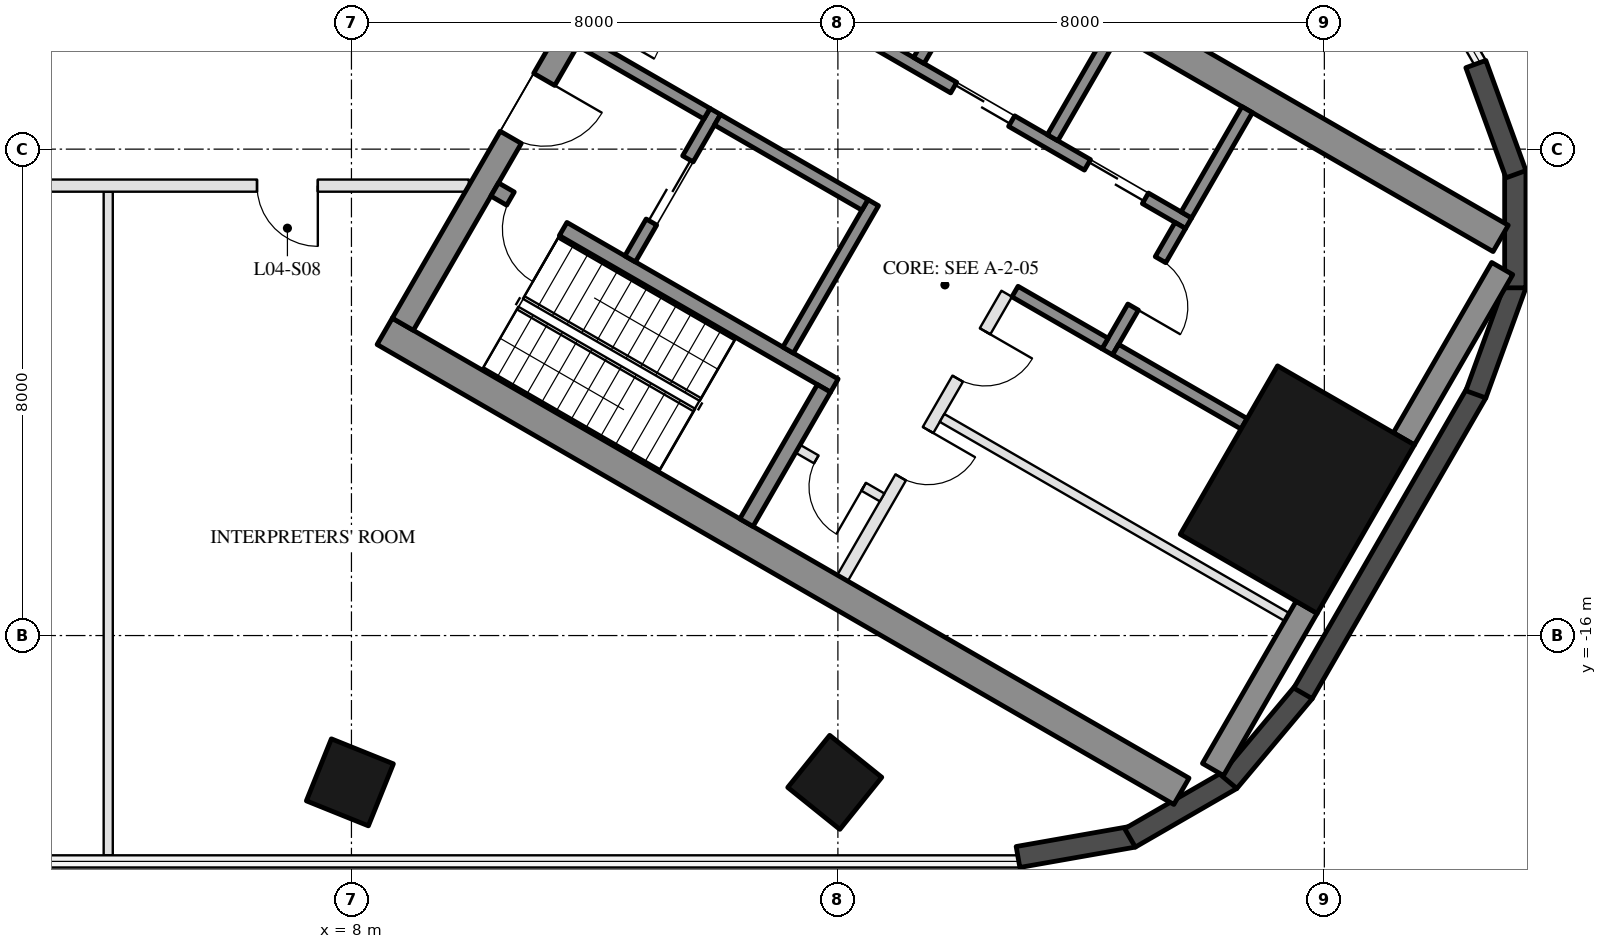
"""IFC4 building model, lengths in metres.
Left out: names, types, materials, properties, quantities, classifications, styles, units other than length and angle.
Written with IfcOpenShell. Run it as: python <this file> out.ifc"""

import sys

from ifc_helpers import new_model, si_unit, direction, frame, frame_2d, origin, origin_2d, place, context, subcontext, project, spatial, rectangle, hollow_rectangle, extrude, boolean, halfspace, element, fill, save


model = new_model("IFC4")
c1 = context("Model", 3, precision=1e-05, world=origin(), true_north=direction((0.0, 1.0)))
c2 = subcontext(c1, "Body", "Model", "MODEL_VIEW")
j1 = project(units=[si_unit("LENGTHUNIT", "METRE"), si_unit("PLANEANGLEUNIT", "RADIAN")], contexts=[c1])
p1 = place(None, origin())
s1 = spatial("IfcSite", under=j1, at=p1, CompositionType="ELEMENT")
p2 = place(p1, origin())
s2 = spatial("IfcBuilding", under=s1, at=p2, CompositionType="ELEMENT")
p3 = place(p2, frame((0.0, 0.0, 28.5)))
s3 = spatial("IfcBuildingStorey", under=s2, at=p3, CompositionType="ELEMENT", Elevation=28.5)
p4 = place(p3, frame((7.974, -18.414, 0.0), z_axis=(-0.012363018834, 0.030690652017, 0.999452469927), x_axis=(0.999923507967, 1.3568651e-05, 0.012368428817)))
e1 = element("IfcColumn", 1, at=p4, inside=s3, PredefinedType="COLUMN", context=c2, shape_type="SweptSolid", body=[
    boolean("DIFFERENCE", boolean("DIFFERENCE", extrude(hollow_rectangle(XDim=1.1, YDim=1.1, WallThickness=0.05, at=origin_2d()), origin(), (0.0, 0.0, 1.0), 4.502), halfspace(frame((0.0, 0.0, 0.011), z_axis=(0.0, 0.0, 1.0), x_axis=(1.0, 0.0, 0.0)), True)), halfspace(frame((0.0, 0.0, 4.492), z_axis=(0.0, 0.0, 1.0), x_axis=(1.0, 0.0, 0.0)), False)),
])
p5 = place(p3, frame((15.948, -18.414, 0.0), z_axis=(-0.024720370768, 0.030683618102, 0.999223407877), x_axis=(0.99969438665, 0.000567544207, 0.024714594742)))
e2 = element("IfcColumn", 2, at=p5, inside=s3, PredefinedType="COLUMN", context=c2, shape_type="SweptSolid", body=[
    boolean("DIFFERENCE", boolean("DIFFERENCE", extrude(hollow_rectangle(XDim=1.1, YDim=1.1, WallThickness=0.05, at=origin_2d()), origin(), (0.0, 0.0, 1.0), 4.503), halfspace(frame((0.0, 0.0, 0.013), z_axis=(0.0, 0.0, 1.0), x_axis=(1.0, 0.0, 0.0)), True)), halfspace(frame((0.0, 0.0, 4.491), z_axis=(0.0, 0.0, 1.0), x_axis=(1.0, 0.0, 0.0)), False)),
])
p6 = place(p3, frame((23.556, -13.6, 0.0), z_axis=(0.0, 0.0, 1.0), x_axis=(0.5, 0.866025403784, 0.0)))
e3 = element("IfcColumn", 3, at=p6, inside=s3, PredefinedType="COLUMN", context=c2, shape_type="SweptSolid", body=[
    extrude(hollow_rectangle(XDim=3.2, YDim=2.6, WallThickness=0.08, at=origin_2d()), origin(), (0.0, 0.0, 1.0), 4.5),
])
for number, where, z_axis, x_axis in (
    (4, (18.962, -19.642, 0.0), (0.0, 0.0, 1.0), (0.985, 0.174, 0.0)),
    (5, (20.804, -19.328, 0.0), (0.0, 0.0, 1.0), (0.866, 0.5, 0.0)),
    (6, (22.427, -18.403, 0.0), (0.0, 0.0, 1.0), (0.643, 0.766, 0.0)),
):
    element("IfcWall", number, at=place(p3, frame(where, z_axis=z_axis, x_axis=x_axis)), inside=s3, PredefinedType="SOLIDWALL", context=c2, shape_type="SweptSolid", body=[
        extrude(rectangle(XDim=1.928, YDim=0.35, at=frame_2d((0.964, 0.0))), origin(), (0.0, 0.0, 1.0), 4.2),
    ])
p7 = place(p3, frame((23.649, -16.951, 0.0), z_axis=(0.0, 0.0, 1.0), x_axis=(0.500014776476, 0.866016872414, 0.0)))
e7 = element("IfcWall", 7, at=p7, inside=s3, PredefinedType="SOLIDWALL", context=c2, shape_type="SweptSolid", body=[
    extrude(rectangle(XDim=5.711, YDim=0.35, at=frame_2d((2.855, 0.0))), origin(), (0.0, 0.0, 1.0), 4.2),
])
for number, where, z_axis, x_axis in (
    (8, (26.491, -12.033, 0.0), (0.0, 0.0, 1.0), (0.342, 0.94, 0.0)),
    (9, (27.14, -10.281, 0.0), (0.0, 0.0, 1.0), (0.0, 1.0, 0.0)),
    (10, (27.151, -8.413, 0.0), (0.0, 0.0, 1.0), (-0.342, 0.94, 0.0)),
):
    element("IfcWall", number, at=place(p3, frame(where, z_axis=z_axis, x_axis=x_axis)), inside=s3, PredefinedType="SOLIDWALL", context=c2, shape_type="SweptSolid", body=[
        extrude(rectangle(XDim=1.928, YDim=0.35, at=frame_2d((0.964, 0.0))), origin(), (0.0, 0.0, 1.0), 4.2),
    ])
for number, where, z_axis, x_axis in (
    (11, (8.547, -10.997, 0.0), (0.0, 0.0, 1.0), (0.866, -0.5, 0.0)),
    (12, (13.797, -1.903, 0.0), (0.0, 0.0, 1.0), (0.866, -0.5, 0.0)),
):
    element("IfcWall", number, at=place(p3, frame(where, z_axis=z_axis, x_axis=x_axis)), inside=s3, PredefinedType="SHEAR", context=c2, shape_type="SweptSolid", body=[
        extrude(rectangle(XDim=15.13, YDim=0.5, at=frame_2d((7.565, 0.0))), origin(), (0.0, 0.0, 1.0), 4.2),
    ])
p8 = place(p3, frame((8.845, -10.88, 0.0), z_axis=(0.0, 0.0, 1.0), x_axis=(0.500004234368, 0.866022959057, 0.0)))
e13 = element("IfcWall", 13, at=p8, inside=s3, PredefinedType="SHEAR", context=c2, shape_type="SweptSolid", body=[
    extrude(rectangle(XDim=10.0, YDim=0.4, at=frame_2d((5.0, 0.0))), origin(), (0.0, 0.0, 1.0), 4.2),
])
p9 = place(p8, frame((3.55, 0.0, 0.0)))
e14 = element("IfcOpeningElement", 14, at=p9, cuts=e13, PredefinedType="OPENING", context=c2, shape_type="SweptSolid", body=[
    extrude(rectangle(XDim=1.1, YDim=2.1, at=frame_2d((0.55, 1.05))), frame((0.0, 0.21, 0.0), z_axis=(0.0, -1.0, 0.0), x_axis=(1.0, 0.0, 0.0)), (0.0, 0.0, 1.0), 0.42),
])
p10 = place(p8, frame((5.85, 0.0, 0.0)))
e15 = element("IfcOpeningElement", 15, at=p10, cuts=e13, PredefinedType="OPENING", context=c2, shape_type="SweptSolid", body=[
    extrude(rectangle(XDim=1.4, YDim=2.1, at=frame_2d((0.7, 1.05))), frame((0.0, 0.21, 0.0), z_axis=(0.0, -1.0, 0.0), x_axis=(1.0, 0.0, 0.0)), (0.0, 0.0, 1.0), 0.42),
])
p11 = place(p3, frame((22.168, -18.203, 0.0), z_axis=(0.0, 0.0, 1.0), x_axis=(0.500026652407, 0.866010015463, 0.0)))
e16 = element("IfcWall", 16, at=p11, inside=s3, PredefinedType="SHEAR", context=c2, shape_type="SweptSolid", body=[
    extrude(rectangle(XDim=3.08, YDim=0.4, at=frame_2d((1.54, 0.0))), origin(), (0.0, 0.0, 1.0), 4.2),
])
p12 = place(p3, frame((25.309, -12.764, 0.0), z_axis=(0.0, 0.0, 1.0), x_axis=(0.499955552719, 0.866051063914, 0.0)))
e17 = element("IfcWall", 17, at=p12, inside=s3, PredefinedType="SHEAR", context=c2, shape_type="SweptSolid", body=[
    extrude(rectangle(XDim=3.234, YDim=0.4, at=frame_2d((1.617, 0.0))), origin(), (0.0, 0.0, 1.0), 4.2),
])
p13 = place(p3, frame((10.356, -8.664, 0.0), z_axis=(0.0, 0.0, 1.0), x_axis=(0.866028629588, -0.499994412703, 0.0)))
e18 = element("IfcWall", 18, at=p13, inside=s3, PredefinedType="SHEAR", context=c2, shape_type="SweptSolid", body=[
    extrude(rectangle(XDim=6.45, YDim=0.25, at=frame_2d((3.225, 0.0))), origin(), (0.0, 0.0, 1.0), 4.2),
])
p14 = place(p13, frame((0.3, 0.0, 0.0)))
e19 = element("IfcOpeningElement", 19, at=p14, cuts=e18, PredefinedType="OPENING", context=c2, shape_type="SweptSolid", body=[
    extrude(rectangle(XDim=1.0, YDim=2.1, at=frame_2d((0.5, 1.05))), frame((0.0, 0.135, 0.0), z_axis=(0.0, -1.0, 0.0), x_axis=(1.0, 0.0, 0.0)), (0.0, 0.0, 1.0), 0.27),
])
p15 = place(p3, frame((14.496, -14.143, 0.0), z_axis=(0.0, 0.0, 1.0), x_axis=(0.500062241894, 0.865989465428, 0.0)))
e20 = element("IfcWall", 20, at=p15, inside=s3, PredefinedType="SHEAR", context=c2, shape_type="SweptSolid", body=[
    extrude(rectangle(XDim=2.55, YDim=0.25, at=frame_2d((1.275, 0.0))), origin(), (0.0, 0.0, 1.0), 4.2),
])
p16 = place(p3, frame((15.181, -11.305, 0.0), z_axis=(0.0, 0.0, 1.0), x_axis=(0.49994636267, 0.866056369097, 0.0)))
e21 = element("IfcWall", 21, at=p16, inside=s3, PredefinedType="SHEAR", context=c2, shape_type="SweptSolid", body=[
    extrude(rectangle(XDim=2.8, YDim=0.2, at=frame_2d((1.4, 0.0))), origin(), (0.0, 0.0, 1.0), 4.2),
])
p17 = place(p3, frame((12.583, -9.805, 0.0), z_axis=(0.0, 0.0, 1.0), x_axis=(0.49994636267, 0.866056369097, 0.0)))
e22 = element("IfcWall", 22, at=p17, inside=s3, PredefinedType="SHEAR", context=c2, shape_type="SweptSolid", body=[
    extrude(rectangle(XDim=2.8, YDim=0.2, at=frame_2d((1.4, 0.0))), origin(), (0.0, 0.0, 1.0), 4.2),
])
p18 = place(p17, frame((0.7, 0.0, 0.0)))
e23 = element("IfcOpeningElement", 23, at=p18, cuts=e22, PredefinedType="OPENING", context=c2, shape_type="SweptSolid", body=[
    extrude(rectangle(XDim=1.2, YDim=2.1, at=frame_2d((0.6, 1.05))), frame((0.0, 0.11, 0.0), z_axis=(0.0, -1.0, 0.0), x_axis=(1.0, 0.0, 0.0)), (0.0, 0.0, 1.0), 0.22),
])
p19 = place(p3, frame((11.768, -6.217, 0.0), z_axis=(0.0, 0.0, 1.0), x_axis=(0.866050077142, -0.499957262057, 0.0)))
e24 = element("IfcWall", 24, at=p19, inside=s3, PredefinedType="SHEAR", context=c2, shape_type="SweptSolid", body=[
    extrude(rectangle(XDim=2.4, YDim=0.2, at=frame_2d((1.2, 0.0))), origin(), (0.0, 0.0, 1.0), 4.2),
])
p20 = place(p3, frame((14.02, -7.517, 0.0), z_axis=(0.0, 0.0, 1.0), x_axis=(0.866034573852, -0.49998411664, 0.0)))
e25 = element("IfcWall", 25, at=p20, inside=s3, PredefinedType="SHEAR", context=c2, shape_type="SweptSolid", body=[
    extrude(rectangle(XDim=2.8, YDim=0.2, at=frame_2d((1.4, 0.0))), origin(), (0.0, 0.0, 1.0), 4.2),
])
p21 = place(p3, frame((12.968, -4.138, 0.0), z_axis=(0.0, 0.0, 1.0), x_axis=(0.866028328073, -0.49999493495, 0.0)))
e26 = element("IfcWall", 26, at=p21, inside=s3, PredefinedType="SHEAR", context=c2, shape_type="SweptSolid", body=[
    extrude(rectangle(XDim=10.16, YDim=0.2, at=frame_2d((5.08, 0.0))), origin(), (0.0, 0.0, 1.0), 4.2),
])
p22 = place(p21, frame((0.62, 0.0, 0.0)))
e27 = element("IfcOpeningElement", 27, at=p22, cuts=e26, PredefinedType="OPENING", context=c2, shape_type="SweptSolid", body=[
    extrude(rectangle(XDim=1.1, YDim=2.1, at=frame_2d((0.55, 1.05))), frame((0.0, 0.11, 0.0), z_axis=(0.0, -1.0, 0.0), x_axis=(1.0, 0.0, 0.0)), (0.0, 0.0, 1.0), 0.22),
])
p23 = place(p21, frame((3.16, 0.0, 0.0)))
e28 = element("IfcOpeningElement", 28, at=p23, cuts=e26, PredefinedType="OPENING", context=c2, shape_type="SweptSolid", body=[
    extrude(rectangle(XDim=1.1, YDim=2.1, at=frame_2d((0.55, 1.05))), frame((0.0, 0.11, 0.0), z_axis=(0.0, -1.0, 0.0), x_axis=(1.0, 0.0, 0.0)), (0.0, 0.0, 1.0), 0.22),
])
p24 = place(p21, frame((5.7, 0.0, 0.0)))
e29 = element("IfcOpeningElement", 29, at=p24, cuts=e26, PredefinedType="OPENING", context=c2, shape_type="SweptSolid", body=[
    extrude(rectangle(XDim=1.1, YDim=2.1, at=frame_2d((0.55, 1.05))), frame((0.0, 0.11, 0.0), z_axis=(0.0, -1.0, 0.0), x_axis=(1.0, 0.0, 0.0)), (0.0, 0.0, 1.0), 0.22),
])
p25 = place(p21, frame((8.24, 0.0, 0.0)))
e30 = element("IfcOpeningElement", 30, at=p25, cuts=e26, PredefinedType="OPENING", context=c2, shape_type="SweptSolid", body=[
    extrude(rectangle(XDim=1.1, YDim=2.1, at=frame_2d((0.55, 1.05))), frame((0.0, 0.11, 0.0), z_axis=(0.0, -1.0, 0.0), x_axis=(1.0, 0.0, 0.0)), (0.0, 0.0, 1.0), 0.22),
])
p26 = place(p3, frame((20.43, -11.333, 0.0), z_axis=(0.0, 0.0, 1.0), x_axis=(0.500001309137, 0.866024647952, 0.0)))
e31 = element("IfcWall", 31, at=p26, inside=s3, PredefinedType="SHEAR", context=c2, shape_type="SweptSolid", body=[
    extrude(rectangle(XDim=2.4, YDim=0.2, at=frame_2d((1.2, 0.0))), origin(), (0.0, 0.0, 1.0), 4.2),
])
p27 = place(p26, frame((0.85, 0.0, 0.0)))
e32 = element("IfcOpeningElement", 32, at=p27, cuts=e31, PredefinedType="OPENING", context=c2, shape_type="SweptSolid", body=[
    extrude(rectangle(XDim=0.9, YDim=2.1, at=frame_2d((0.45, 1.05))), frame((0.0, 0.11, 0.0), z_axis=(0.0, -1.0, 0.0), x_axis=(1.0, 0.0, 0.0)), (0.0, 0.0, 1.0), 0.22),
])
p28 = place(p3, frame((18.913, -10.342, 0.0), z_axis=(0.0, 0.0, 1.0), x_axis=(0.866038183914, -0.499977863513, 0.0)))
e33 = element("IfcWall", 33, at=p28, inside=s3, PredefinedType="SHEAR", context=c2, shape_type="SweptSolid", body=[
    extrude(rectangle(XDim=1.71, YDim=0.2, at=frame_2d((0.855, 0.0))), origin(), (0.0, 0.0, 1.0), 4.2),
])
for number, where, z_axis, x_axis in (
    (34, (17.331, -6.542, 0.0), (0.0, 0.0, 1.0), (0.5, 0.866, 0.0)),
    (35, (19.531, -7.812, 0.0), (0.0, 0.0, 1.0), (0.5, 0.866, 0.0)),
    (36, (21.73, -9.082, 0.0), (0.0, 0.0, 1.0), (0.5, 0.866, 0.0)),
):
    element("IfcWall", number, at=place(p3, frame(where, z_axis=z_axis, x_axis=x_axis)), inside=s3, PredefinedType="SHEAR", context=c2, shape_type="SweptSolid", body=[
        extrude(rectangle(XDim=2.0, YDim=0.2, at=frame_2d((1.0, 0.0))), origin(), (0.0, 0.0, 1.0), 4.2),
    ])
p29 = place(p3, frame((20.567, -11.297, 0.0), z_axis=(0.0, 0.0, 1.0), x_axis=(0.866048967903, -0.499959183527, 0.0)))
e37 = element("IfcWall", 37, at=p29, inside=s3, PredefinedType="SHEAR", context=c2, shape_type="SweptSolid", body=[
    extrude(rectangle(XDim=2.44, YDim=0.2, at=frame_2d((1.22, 0.0))), origin(), (0.0, 0.0, 1.0), 4.2),
])
p30 = place(p3, frame((16.076, -15.055, 0.0), z_axis=(0.0, 0.0, 1.0), x_axis=(0.499995103361, 0.866028230842, 0.0)))
e38 = element("IfcWall", 38, at=p30, inside=s3, PredefinedType="PARTITIONING", context=c2, shape_type="SweptSolid", body=[
    extrude(rectangle(XDim=5.4, YDim=0.2, at=frame_2d((2.7, 0.0))), origin(), (0.0, 0.0, 1.0), 4.2),
])
p31 = place(p30, frame((1.913, 0.0, 0.0)))
e39 = element("IfcOpeningElement", 39, at=p31, cuts=e38, PredefinedType="OPENING", context=c2, shape_type="SweptSolid", body=[
    extrude(rectangle(XDim=0.9, YDim=2.1, at=frame_2d((0.45, 1.05))), frame((0.0, 0.11, 0.0), z_axis=(0.0, -1.0, 0.0), x_axis=(1.0, 0.0, 0.0)), (0.0, 0.0, 1.0), 0.22),
])
p32 = place(p30, frame((3.788, 0.0, 0.0)))
e40 = element("IfcOpeningElement", 40, at=p32, cuts=e38, PredefinedType="OPENING", context=c2, shape_type="SweptSolid", body=[
    extrude(rectangle(XDim=0.9, YDim=2.1, at=frame_2d((0.45, 1.05))), frame((0.0, 0.11, 0.0), z_axis=(0.0, -1.0, 0.0), x_axis=(1.0, 0.0, 0.0)), (0.0, 0.0, 1.0), 0.22),
])
p33 = place(p3, frame((15.342, -12.928, 0.0), z_axis=(0.0, 0.0, 1.0), x_axis=(0.865989903783, -0.500061482766, 0.0)))
e41 = element("IfcWall", 41, at=p33, inside=s3, PredefinedType="PARTITIONING", context=c2, shape_type="SweptSolid", body=[
    extrude(rectangle(XDim=1.6, YDim=0.15, at=frame_2d((0.8, 0.0))), origin(), (0.0, 0.0, 1.0), 4.2),
])
p34 = place(p33, frame((0.35, 0.0, 0.0)))
e42 = element("IfcOpeningElement", 42, at=p34, cuts=e41, PredefinedType="OPENING", context=c2, shape_type="SweptSolid", body=[
    extrude(rectangle(XDim=0.9, YDim=2.1, at=frame_2d((0.45, 1.05))), frame((0.0, 0.085, 0.0), z_axis=(0.0, -1.0, 0.0), x_axis=(1.0, 0.0, 0.0)), (0.0, 0.0, 1.0), 0.17),
])
p35 = place(p3, frame((17.713, -12.42, 0.0), z_axis=(0.0, 0.0, 1.0), x_axis=(0.866027924134, -0.499995634601, 0.0)))
e43 = element("IfcWall", 43, at=p35, inside=s3, PredefinedType="PARTITIONING", context=c2, shape_type="SweptSolid", body=[
    extrude(rectangle(XDim=6.55, YDim=0.15, at=frame_2d((3.275, 0.0))), origin(), (0.0, 0.0, 1.0), 4.2),
])
p36 = place(p3, frame((4.0, -19.614, 0.0), z_axis=(0.0, 0.0, 1.0), x_axis=(0.0, 1.0, 0.0)))
e44 = element("IfcWall", 44, at=p36, inside=s3, PredefinedType="PARTITIONING", context=c2, shape_type="SweptSolid", body=[
    extrude(rectangle(XDim=10.914, YDim=0.15, at=frame_2d((5.457, 0.0))), origin(), (0.0, 0.0, 1.0), 3.41),
])
p37 = place(p3, frame((-9.93, -8.6, 0.0), z_axis=(0.0, 0.0, 1.0), x_axis=(1.0, 0.0, 0.0)))
e45 = element("IfcWall", 45, at=p37, inside=s3, PredefinedType="PARTITIONING", context=c2, shape_type="SweptSolid", body=[
    extrude(rectangle(XDim=19.861, YDim=0.2, at=frame_2d((9.93, 0.0))), origin(), (0.0, 0.0, 1.0), 3.41),
])
p38 = place(p37, frame((2.592, 0.0, 0.0)))
e46 = element("IfcOpeningElement", 46, at=p38, cuts=e45, PredefinedType="OPENING", context=c2, shape_type="SweptSolid", body=[
    extrude(rectangle(XDim=1.8, YDim=2.4, at=frame_2d((0.9, 1.2))), frame((0.0, 0.11, 0.0), z_axis=(0.0, -1.0, 0.0), x_axis=(1.0, 0.0, 0.0)), (0.0, 0.0, 1.0), 0.22),
])
p39 = place(p37, frame((9.575, 0.0, 0.0)))
e47 = element("IfcOpeningElement", 47, at=p39, cuts=e45, PredefinedType="OPENING", context=c2, shape_type="SweptSolid", body=[
    extrude(rectangle(XDim=1.8, YDim=2.4, at=frame_2d((0.9, 1.2))), frame((0.0, 0.11, 0.0), z_axis=(0.0, -1.0, 0.0), x_axis=(1.0, 0.0, 0.0)), (0.0, 0.0, 1.0), 0.22),
])
p40 = place(p37, frame((16.377, 0.0, 0.0)))
e48 = element("IfcOpeningElement", 48, at=p40, cuts=e45, PredefinedType="OPENING", context=c2, shape_type="SweptSolid", body=[
    extrude(rectangle(XDim=1.0, YDim=2.1, at=frame_2d((0.5, 1.05))), frame((0.0, 0.11, 0.0), z_axis=(0.0, -1.0, 0.0), x_axis=(1.0, 0.0, 0.0)), (0.0, 0.0, 1.0), 0.22),
])
p41 = place(p18, origin())
e49 = element("IfcDoor", 49, at=p41, inside=s3, OperationType="DOUBLE_DOOR_SLIDING", PredefinedType="DOOR", context=c2, shape_type="SweptSolid", body=[
    extrude(rectangle(XDim=1.2, YDim=2.1, at=frame_2d((0.6, 1.05))), frame((0.0, 0.025, 0.0), z_axis=(0.0, -1.0, 0.0), x_axis=(1.0, 0.0, 0.0)), (0.0, 0.0, 1.0), 0.05),
])
fill(e23, e49)
p42 = place(p34, frame((0.9, 0.0, 0.0), z_axis=(0.0, 0.0, 1.0), x_axis=(-1.0, 0.0, 0.0)))
e50 = element("IfcDoor", 50, at=p42, inside=s3, OperationType="SINGLE_SWING_LEFT", PredefinedType="DOOR", context=c2, shape_type="SweptSolid", body=[
    extrude(rectangle(XDim=0.9, YDim=2.1, at=frame_2d((0.45, 1.05))), frame((0.0, 0.025, 0.0), z_axis=(0.0, -1.0, 0.0), x_axis=(1.0, 0.0, 0.0)), (0.0, 0.0, 1.0), 0.05),
])
fill(e42, e50)
p43 = place(p24, origin())
e51 = element("IfcDoor", 51, at=p43, inside=s3, OperationType="DOUBLE_DOOR_SLIDING", PredefinedType="DOOR", context=c2, shape_type="SweptSolid", body=[
    extrude(rectangle(XDim=1.1, YDim=2.1, at=frame_2d((0.55, 1.05))), frame((0.0, 0.025, 0.0), z_axis=(0.0, -1.0, 0.0), x_axis=(1.0, 0.0, 0.0)), (0.0, 0.0, 1.0), 0.05),
])
fill(e29, e51)
p44 = place(p25, origin())
e52 = element("IfcDoor", 52, at=p44, inside=s3, OperationType="DOUBLE_DOOR_SLIDING", PredefinedType="DOOR", context=c2, shape_type="SweptSolid", body=[
    extrude(rectangle(XDim=1.1, YDim=2.1, at=frame_2d((0.55, 1.05))), frame((0.0, 0.025, 0.0), z_axis=(0.0, -1.0, 0.0), x_axis=(1.0, 0.0, 0.0)), (0.0, 0.0, 1.0), 0.05),
])
fill(e30, e52)
p45 = place(p27, frame((0.9, 0.0, 0.0), z_axis=(0.0, 0.0, 1.0), x_axis=(-1.0, 0.0, 0.0)))
e53 = element("IfcDoor", 53, at=p45, inside=s3, OperationType="SINGLE_SWING_RIGHT", PredefinedType="DOOR", context=c2, shape_type="SweptSolid", body=[
    extrude(rectangle(XDim=0.9, YDim=2.1, at=frame_2d((0.45, 1.05))), frame((0.0, 0.025, 0.0), z_axis=(0.0, -1.0, 0.0), x_axis=(1.0, 0.0, 0.0)), (0.0, 0.0, 1.0), 0.05),
])
fill(e32, e53)
p46 = place(p31, frame((0.9, 0.0, 0.0), z_axis=(0.0, 0.0, 1.0), x_axis=(-1.0, 0.0, 0.0)))
e54 = element("IfcDoor", 54, at=p46, inside=s3, OperationType="SINGLE_SWING_LEFT", PredefinedType="DOOR", context=c2, shape_type="SweptSolid", body=[
    extrude(rectangle(XDim=0.9, YDim=2.1, at=frame_2d((0.45, 1.05))), frame((0.0, 0.025, 0.0), z_axis=(0.0, -1.0, 0.0), x_axis=(1.0, 0.0, 0.0)), (0.0, 0.0, 1.0), 0.05),
])
fill(e39, e54)
p47 = place(p32, frame((0.9, 0.0, 0.0), z_axis=(0.0, 0.0, 1.0), x_axis=(-1.0, 0.0, 0.0)))
e55 = element("IfcDoor", 55, at=p47, inside=s3, OperationType="SINGLE_SWING_LEFT", PredefinedType="DOOR", context=c2, shape_type="SweptSolid", body=[
    extrude(rectangle(XDim=0.9, YDim=2.1, at=frame_2d((0.45, 1.05))), frame((0.0, 0.025, 0.0), z_axis=(0.0, -1.0, 0.0), x_axis=(1.0, 0.0, 0.0)), (0.0, 0.0, 1.0), 0.05),
])
fill(e40, e55)
p48 = place(p9, frame((1.1, 0.0, 0.0), z_axis=(0.0, 0.0, 1.0), x_axis=(-1.0, 0.0, 0.0)))
e56 = element("IfcDoor", 56, at=p48, inside=s3, OperationType="SINGLE_SWING_LEFT", PredefinedType="DOOR", context=c2, shape_type="SweptSolid", body=[
    extrude(rectangle(XDim=1.1, YDim=2.1, at=frame_2d((0.55, 1.05))), frame((0.0, 0.025, 0.0), z_axis=(0.0, -1.0, 0.0), x_axis=(1.0, 0.0, 0.0)), (0.0, 0.0, 1.0), 0.05),
])
fill(e14, e56)
p49 = place(p14, frame((1.0, 0.0, 0.0), z_axis=(0.0, 0.0, 1.0), x_axis=(-1.0, 0.0, 0.0)))
e57 = element("IfcDoor", 57, at=p49, inside=s3, OperationType="SINGLE_SWING_LEFT", PredefinedType="DOOR", context=c2, shape_type="SweptSolid", body=[
    extrude(rectangle(XDim=1.0, YDim=2.1, at=frame_2d((0.5, 1.05))), frame((0.0, 0.025, 0.0), z_axis=(0.0, -1.0, 0.0), x_axis=(1.0, 0.0, 0.0)), (0.0, 0.0, 1.0), 0.05),
])
fill(e19, e57)
p50 = place(p40, frame((1.0, 0.0, 0.0), z_axis=(0.0, 0.0, 1.0), x_axis=(-1.0, 0.0, 0.0)))
e58 = element("IfcDoor", 58, at=p50, inside=s3, OperationType="SINGLE_SWING_LEFT", PredefinedType="DOOR", context=c2, shape_type="SweptSolid", body=[
    extrude(rectangle(XDim=1.0, YDim=2.1, at=frame_2d((0.5, 1.05))), frame((0.0, 0.025, 0.0), z_axis=(0.0, -1.0, 0.0), x_axis=(1.0, 0.0, 0.0)), (0.0, 0.0, 1.0), 0.05),
])
fill(e48, e58)
save(model, sys.argv[1])
